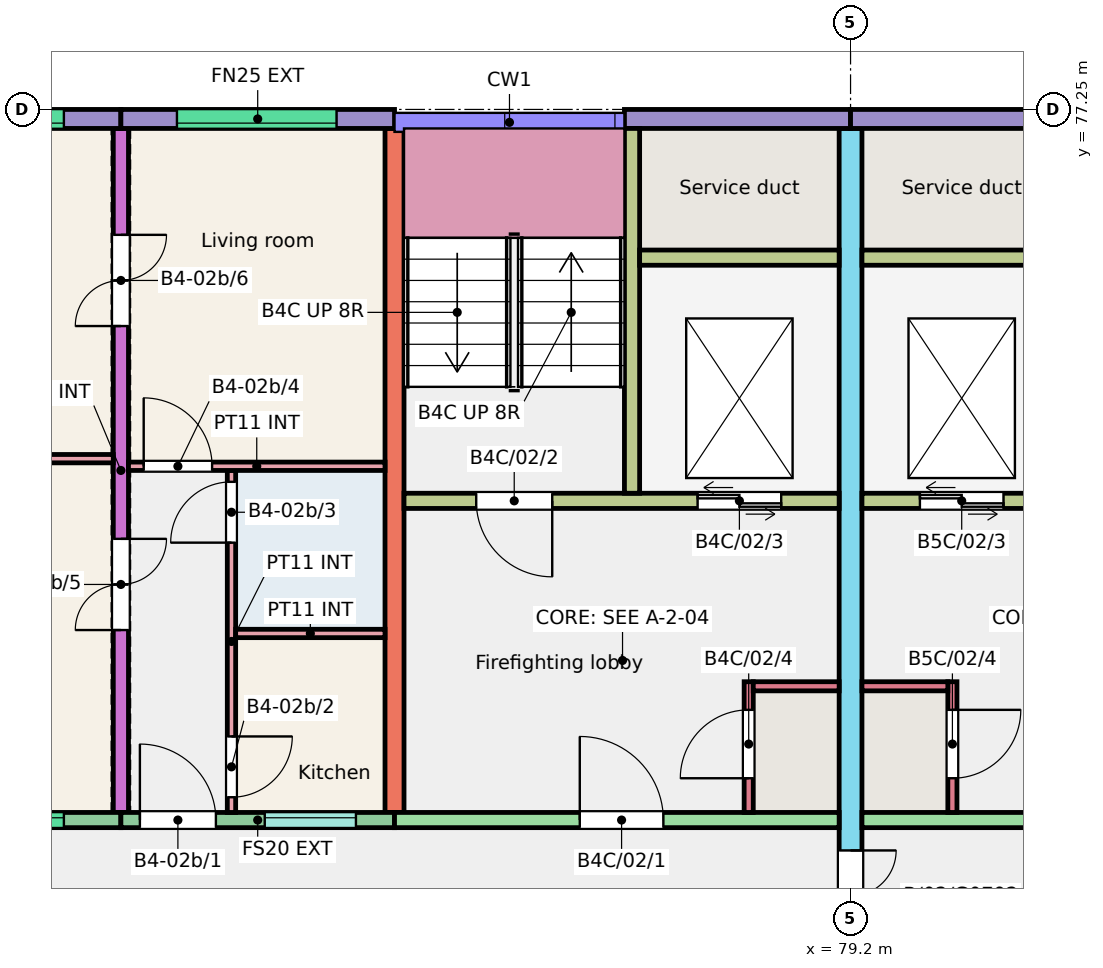
"""IFC4 building model, lengths in metres.
Left out: names, types, materials, properties, quantities, classifications, styles, units other than length and angle.
Written with IfcOpenShell. Run it as: python <this file> out.ifc"""

import sys

from ifc_helpers import new_model, si_unit, direction, frame, frame_2d, origin, place, context, subcontext, project, spatial, rectangle, extrude, element, fill, save


model = new_model("IFC4")
c1 = context("Model", 3, precision=1e-05, world=origin(), true_north=direction((0.0, 1.0)))
c2 = subcontext(c1, "Body", "Model", "MODEL_VIEW")
j1 = project(units=[si_unit("LENGTHUNIT", "METRE"), si_unit("PLANEANGLEUNIT", "RADIAN")], contexts=[c1])
p1 = place(None, origin())
s1 = spatial("IfcSite", under=j1, at=p1, CompositionType="ELEMENT")
p2 = place(p1, origin())
s2 = spatial("IfcBuilding", under=s1, at=p2, CompositionType="ELEMENT")
p3 = place(p2, frame((0.0, 0.0, 6.0)))
s3 = spatial("IfcBuildingStorey", under=s2, at=p3, CompositionType="ELEMENT", Elevation=6.0)
p4 = place(p3, frame((69.6, 68.0, 0.0), z_axis=(0.0, 0.0, 1.0), x_axis=(0.0, 1.0, 0.0)))
e1 = element("IfcWall", 1, at=p4, inside=s3, PredefinedType="SHEAR", context=c2, shape_type="SweptSolid", body=[
    extrude(rectangle(XDim=9.0, YDim=0.2, at=frame_2d((4.5, 0.0))), origin(), (0.0, 0.0, 1.0), 3.0),
])
p5 = place(p4, frame((2.4, 0.0, 0.0)))
e2 = element("IfcOpeningElement", 2, at=p5, cuts=e1, PredefinedType="OPENING", context=c2, shape_type="SweptSolid", body=[
    extrude(rectangle(XDim=1.2, YDim=2.1, at=frame_2d((0.6, 1.05))), frame((0.0, 0.11, 0.0), z_axis=(0.0, -1.0, 0.0), x_axis=(1.0, 0.0, 0.0)), (0.0, 0.0, 1.0), 0.22),
])
p6 = place(p4, frame((6.4, 0.0, 0.0)))
e3 = element("IfcOpeningElement", 3, at=p6, cuts=e1, PredefinedType="OPENING", context=c2, shape_type="SweptSolid", body=[
    extrude(rectangle(XDim=1.2, YDim=2.1, at=frame_2d((0.6, 1.05))), frame((0.0, 0.11, 0.0), z_axis=(0.0, -1.0, 0.0), x_axis=(1.0, 0.0, 0.0)), (0.0, 0.0, 1.0), 0.22),
])
p7 = place(p3, frame((73.2, 68.0, 0.0), z_axis=(0.0, 0.0, 1.0), x_axis=(0.0, 1.0, 0.0)))
e4 = element("IfcWall", 4, at=p7, inside=s3, PredefinedType="SHEAR", context=c2, shape_type="SweptSolid", body=[
    extrude(rectangle(XDim=9.0, YDim=0.25, at=frame_2d((4.5, 0.0))), origin(), (0.0, 0.0, 1.0), 3.0),
])
p8 = place(p3, frame((79.2, 66.0, 0.0), z_axis=(0.0, 0.0, 1.0), x_axis=(0.0, 1.0, 0.0)))
e5 = element("IfcWall", 5, at=p8, inside=s3, PredefinedType="SHEAR", context=c2, shape_type="SweptSolid", body=[
    extrude(rectangle(XDim=11.0, YDim=0.3, at=frame_2d((5.5, 0.0))), origin(), (0.0, 0.0, 1.0), 3.0),
])
p9 = place(p8, frame((0.3, 0.0, 0.0)))
e6 = element("IfcOpeningElement", 6, at=p9, cuts=e5, PredefinedType="OPENING", context=c2, shape_type="SweptSolid", body=[
    extrude(rectangle(XDim=1.2, YDim=2.1, at=frame_2d((0.6, 1.05))), frame((0.0, 0.16, 0.0), z_axis=(0.0, -1.0, 0.0), x_axis=(1.0, 0.0, 0.0)), (0.0, 0.0, 1.0), 0.32),
])
p10 = place(p3, frame((66.0, 77.125, 0.0), z_axis=(0.0, 0.0, 1.0), x_axis=(1.0, 0.0, 0.0)))
e7 = element("IfcWall", 7, at=p10, inside=s3, PredefinedType="SOLIDWALL", context=c2, shape_type="SweptSolid", body=[
    extrude(rectangle(XDim=3.6, YDim=0.25, at=frame_2d((1.8, 0.0))), origin(), (0.0, 0.0, 1.0), 3.0),
])
p11 = place(p10, frame((0.75, 0.0, 1.2)))
e8 = element("IfcOpeningElement", 8, at=p11, cuts=e7, PredefinedType="OPENING", context=c2, shape_type="SweptSolid", body=[
    extrude(rectangle(XDim=2.1, YDim=1.2, at=frame_2d((1.05, 0.6))), frame((0.0, 0.135, 0.0), z_axis=(0.0, -1.0, 0.0), x_axis=(1.0, 0.0, 0.0)), (0.0, 0.0, 1.0), 0.27),
])
p12 = place(p3, frame((66.0, 67.9, 0.0), z_axis=(0.0, 0.0, 1.0), x_axis=(1.0, 0.0, 0.0)))
e9 = element("IfcWall", 9, at=p12, inside=s3, PredefinedType="SOLIDWALL", context=c2, shape_type="SweptSolid", body=[
    extrude(rectangle(XDim=3.6, YDim=0.2, at=frame_2d((1.8, 0.0))), origin(), (0.0, 0.0, 1.0), 3.0),
])
p13 = place(p12, frame((0.75, 0.0, 1.2)))
e10 = element("IfcOpeningElement", 10, at=p13, cuts=e9, PredefinedType="OPENING", context=c2, shape_type="SweptSolid", body=[
    extrude(rectangle(XDim=2.1, YDim=1.2, at=frame_2d((1.05, 0.6))), frame((0.0, 0.11, 0.0), z_axis=(0.0, -1.0, 0.0), x_axis=(1.0, 0.0, 0.0)), (0.0, 0.0, 1.0), 0.22),
])
p14 = place(p3, frame((69.6, 77.125, 0.0), z_axis=(0.0, 0.0, 1.0), x_axis=(1.0, 0.0, 0.0)))
e11 = element("IfcWall", 11, at=p14, inside=s3, PredefinedType="SOLIDWALL", context=c2, shape_type="SweptSolid", body=[
    extrude(rectangle(XDim=3.6, YDim=0.25, at=frame_2d((1.8, 0.0))), origin(), (0.0, 0.0, 1.0), 3.0),
])
p15 = place(p14, frame((0.738, 0.0, 1.2)))
e12 = element("IfcOpeningElement", 12, at=p15, cuts=e11, PredefinedType="OPENING", context=c2, shape_type="SweptSolid", body=[
    extrude(rectangle(XDim=2.1, YDim=1.2, at=frame_2d((1.05, 0.6))), frame((0.0, 0.135, 0.0), z_axis=(0.0, -1.0, 0.0), x_axis=(1.0, 0.0, 0.0)), (0.0, 0.0, 1.0), 0.27),
])
p16 = place(p3, frame((69.6, 67.9, 0.0), z_axis=(0.0, 0.0, 1.0), x_axis=(1.0, 0.0, 0.0)))
e13 = element("IfcWall", 13, at=p16, inside=s3, PredefinedType="SOLIDWALL", context=c2, shape_type="SweptSolid", body=[
    extrude(rectangle(XDim=3.6, YDim=0.2, at=frame_2d((1.8, 0.0))), origin(), (0.0, 0.0, 1.0), 3.0),
])
p17 = place(p16, frame((1.893, 0.0, 1.1)))
e14 = element("IfcOpeningElement", 14, at=p17, cuts=e13, PredefinedType="OPENING", context=c2, shape_type="SweptSolid", body=[
    extrude(rectangle(XDim=1.2, YDim=1.3, at=frame_2d((0.6, 0.65))), frame((0.0, 0.11, 0.0), z_axis=(0.0, -1.0, 0.0), x_axis=(1.0, 0.0, 0.0)), (0.0, 0.0, 1.0), 0.22),
])
p18 = place(p16, frame((0.25, 0.0, 0.0)))
e15 = element("IfcOpeningElement", 15, at=p18, cuts=e13, PredefinedType="OPENING", context=c2, shape_type="SweptSolid", body=[
    extrude(rectangle(XDim=1.0, YDim=2.1, at=frame_2d((0.5, 1.05))), frame((0.0, 0.11, 0.0), z_axis=(0.0, -1.0, 0.0), x_axis=(1.0, 0.0, 0.0)), (0.0, 0.0, 1.0), 0.22),
])
p19 = place(p3, frame((76.225, 77.125, 0.0), z_axis=(0.0, 0.0, 1.0), x_axis=(1.0, 0.0, 0.0)))
e16 = element("IfcWall", 16, at=p19, inside=s3, PredefinedType="SOLIDWALL", context=c2, shape_type="SweptSolid", body=[
    extrude(rectangle(XDim=2.975, YDim=0.25, at=frame_2d((1.487, 0.0))), origin(), (0.0, 0.0, 1.0), 3.0),
])
p20 = place(p3, frame((73.2, 67.9, 0.0), z_axis=(0.0, 0.0, 1.0), x_axis=(1.0, 0.0, 0.0)))
e17 = element("IfcWall", 17, at=p20, inside=s3, PredefinedType="SHEAR", context=c2, shape_type="SweptSolid", body=[
    extrude(rectangle(XDim=5.85, YDim=0.2, at=frame_2d((2.925, 0.0))), origin(), (0.0, 0.0, 1.0), 3.0),
])
p21 = place(p20, frame((2.438, 0.0, 0.0)))
e18 = element("IfcOpeningElement", 18, at=p21, cuts=e17, PredefinedType="OPENING", context=c2, shape_type="SweptSolid", body=[
    extrude(rectangle(XDim=1.1, YDim=2.1, at=frame_2d((0.55, 1.05))), frame((0.0, 0.11, 0.0), z_axis=(0.0, -1.0, 0.0), x_axis=(1.0, 0.0, 0.0)), (0.0, 0.0, 1.0), 0.22),
])
p22 = place(p3, frame((73.325, 72.1, 0.0), z_axis=(0.0, 0.0, 1.0), x_axis=(1.0, 0.0, 0.0)))
e19 = element("IfcWall", 19, at=p22, inside=s3, PredefinedType="SHEAR", context=c2, shape_type="SweptSolid", body=[
    extrude(rectangle(XDim=5.725, YDim=0.2, at=frame_2d((2.863, 0.0))), origin(), (0.0, 0.0, 1.0), 3.0),
])
p23 = place(p22, frame((0.95, 0.0, 0.0)))
e20 = element("IfcOpeningElement", 20, at=p23, cuts=e19, PredefinedType="OPENING", context=c2, shape_type="SweptSolid", body=[
    extrude(rectangle(XDim=1.0, YDim=2.1, at=frame_2d((0.5, 1.05))), frame((0.0, 0.11, 0.0), z_axis=(0.0, -1.0, 0.0), x_axis=(1.0, 0.0, 0.0)), (0.0, 0.0, 1.0), 0.22),
])
p24 = place(p22, frame((3.863, 0.0, 0.0)))
e21 = element("IfcOpeningElement", 21, at=p24, cuts=e19, PredefinedType="OPENING", context=c2, shape_type="SweptSolid", body=[
    extrude(rectangle(XDim=1.1, YDim=2.1, at=frame_2d((0.55, 1.05))), frame((0.0, 0.11, 0.0), z_axis=(0.0, -1.0, 0.0), x_axis=(1.0, 0.0, 0.0)), (0.0, 0.0, 1.0), 0.22),
])
p25 = place(p3, frame((76.325, 72.2, 0.0), z_axis=(0.0, 0.0, 1.0), x_axis=(0.0, 1.0, 0.0)))
e22 = element("IfcWall", 22, at=p25, inside=s3, PredefinedType="SHEAR", context=c2, shape_type="SweptSolid", body=[
    extrude(rectangle(XDim=4.8, YDim=0.2, at=frame_2d((2.4, 0.0))), origin(), (0.0, 0.0, 1.0), 3.0),
])
p26 = place(p3, frame((76.425, 75.3, 0.0), z_axis=(0.0, 0.0, 1.0), x_axis=(1.0, 0.0, 0.0)))
e23 = element("IfcWall", 23, at=p26, inside=s3, PredefinedType="SHEAR", context=c2, shape_type="SweptSolid", body=[
    extrude(rectangle(XDim=2.625, YDim=0.2, at=frame_2d((1.312, 0.0))), origin(), (0.0, 0.0, 1.0), 3.0),
])
p27 = place(p3, frame((77.86, 68.0, 0.0), z_axis=(0.0, 0.0, 1.0), x_axis=(0.0, 1.0, 0.0)))
e24 = element("IfcWall", 24, at=p27, inside=s3, PredefinedType="SHEAR", context=c2, shape_type="SweptSolid", body=[
    extrude(rectangle(XDim=1.72, YDim=0.12, at=frame_2d((0.86, 0.0))), origin(), (0.0, 0.0, 1.0), 3.0),
])
p28 = place(p27, frame((0.45, 0.0, 0.0)))
e25 = element("IfcOpeningElement", 25, at=p28, cuts=e24, PredefinedType="OPENING", context=c2, shape_type="SweptSolid", body=[
    extrude(rectangle(XDim=0.9, YDim=2.1, at=frame_2d((0.45, 1.05))), frame((0.0, 0.07, 0.0), z_axis=(0.0, -1.0, 0.0), x_axis=(1.0, 0.0, 0.0)), (0.0, 0.0, 1.0), 0.14),
])
p29 = place(p3, frame((77.92, 69.66, 0.0), z_axis=(0.0, 0.0, 1.0), x_axis=(1.0, 0.0, 0.0)))
e26 = element("IfcWall", 26, at=p29, inside=s3, PredefinedType="SHEAR", context=c2, shape_type="SweptSolid", body=[
    extrude(rectangle(XDim=1.13, YDim=0.12, at=frame_2d((0.565, 0.0))), origin(), (0.0, 0.0, 1.0), 3.0),
])
p30 = place(p3, frame((79.2, 77.125, 0.0), z_axis=(0.0, 0.0, 1.0), x_axis=(1.0, 0.0, 0.0)))
e27 = element("IfcWall", 27, at=p30, inside=s3, PredefinedType="SOLIDWALL", context=c2, shape_type="SweptSolid", body=[
    extrude(rectangle(XDim=2.975, YDim=0.25, at=frame_2d((1.488, 0.0))), origin(), (0.0, 0.0, 1.0), 3.0),
])
p31 = place(p3, frame((79.35, 67.9, 0.0), z_axis=(0.0, 0.0, 1.0), x_axis=(1.0, 0.0, 0.0)))
e28 = element("IfcWall", 28, at=p31, inside=s3, PredefinedType="SHEAR", context=c2, shape_type="SweptSolid", body=[
    extrude(rectangle(XDim=5.85, YDim=0.2, at=frame_2d((2.925, 0.0))), origin(), (0.0, 0.0, 1.0), 3.0),
])
p32 = place(p31, frame((2.312, 0.0, 0.0)))
e29 = element("IfcOpeningElement", 29, at=p32, cuts=e28, PredefinedType="OPENING", context=c2, shape_type="SweptSolid", body=[
    extrude(rectangle(XDim=1.1, YDim=2.1, at=frame_2d((0.55, 1.05))), frame((0.0, 0.11, 0.0), z_axis=(0.0, -1.0, 0.0), x_axis=(1.0, 0.0, 0.0)), (0.0, 0.0, 1.0), 0.22),
])
p33 = place(p3, frame((79.35, 72.1, 0.0), z_axis=(0.0, 0.0, 1.0), x_axis=(1.0, 0.0, 0.0)))
e30 = element("IfcWall", 30, at=p33, inside=s3, PredefinedType="SHEAR", context=c2, shape_type="SweptSolid", body=[
    extrude(rectangle(XDim=5.725, YDim=0.2, at=frame_2d((2.862, 0.0))), origin(), (0.0, 0.0, 1.0), 3.0),
])
p34 = place(p33, frame((3.775, 0.0, 0.0)))
e31 = element("IfcOpeningElement", 31, at=p34, cuts=e30, PredefinedType="OPENING", context=c2, shape_type="SweptSolid", body=[
    extrude(rectangle(XDim=1.0, YDim=2.1, at=frame_2d((0.5, 1.05))), frame((0.0, 0.11, 0.0), z_axis=(0.0, -1.0, 0.0), x_axis=(1.0, 0.0, 0.0)), (0.0, 0.0, 1.0), 0.22),
])
p35 = place(p33, frame((0.762, 0.0, 0.0)))
e32 = element("IfcOpeningElement", 32, at=p35, cuts=e30, PredefinedType="OPENING", context=c2, shape_type="SweptSolid", body=[
    extrude(rectangle(XDim=1.1, YDim=2.1, at=frame_2d((0.55, 1.05))), frame((0.0, 0.11, 0.0), z_axis=(0.0, -1.0, 0.0), x_axis=(1.0, 0.0, 0.0)), (0.0, 0.0, 1.0), 0.22),
])
p36 = place(p3, frame((79.35, 75.3, 0.0), z_axis=(0.0, 0.0, 1.0), x_axis=(1.0, 0.0, 0.0)))
e33 = element("IfcWall", 33, at=p36, inside=s3, PredefinedType="SHEAR", context=c2, shape_type="SweptSolid", body=[
    extrude(rectangle(XDim=2.625, YDim=0.2, at=frame_2d((1.312, 0.0))), origin(), (0.0, 0.0, 1.0), 3.0),
])
p37 = place(p3, frame((80.54, 68.0, 0.0), z_axis=(0.0, 0.0, 1.0), x_axis=(0.0, 1.0, 0.0)))
e34 = element("IfcWall", 34, at=p37, inside=s3, PredefinedType="SHEAR", context=c2, shape_type="SweptSolid", body=[
    extrude(rectangle(XDim=1.72, YDim=0.12, at=frame_2d((0.86, 0.0))), origin(), (0.0, 0.0, 1.0), 3.0),
])
p38 = place(p37, frame((0.45, 0.0, 0.0)))
e35 = element("IfcOpeningElement", 35, at=p38, cuts=e34, PredefinedType="OPENING", context=c2, shape_type="SweptSolid", body=[
    extrude(rectangle(XDim=0.9, YDim=2.1, at=frame_2d((0.45, 1.05))), frame((0.0, 0.07, 0.0), z_axis=(0.0, -1.0, 0.0), x_axis=(1.0, 0.0, 0.0)), (0.0, 0.0, 1.0), 0.14),
])
p39 = place(p3, frame((79.35, 69.66, 0.0), z_axis=(0.0, 0.0, 1.0), x_axis=(1.0, 0.0, 0.0)))
e36 = element("IfcWall", 36, at=p39, inside=s3, PredefinedType="SHEAR", context=c2, shape_type="SweptSolid", body=[
    extrude(rectangle(XDim=1.13, YDim=0.12, at=frame_2d((0.565, 0.0))), origin(), (0.0, 0.0, 1.0), 3.0),
])
p40 = place(p3, frame((71.055, 68.0, 0.0), z_axis=(0.0, 0.0, 1.0), x_axis=(0.0, 1.0, 0.0)))
e37 = element("IfcWall", 37, at=p40, inside=s3, PredefinedType="PARTITIONING", context=c2, shape_type="SweptSolid", body=[
    extrude(rectangle(XDim=4.5, YDim=0.11, at=frame_2d((2.25, 0.0))), origin(), (0.0, 0.0, 1.0), 2.8),
])
p41 = place(p40, frame((0.2, 0.0, 0.0)))
e38 = element("IfcOpeningElement", 38, at=p41, cuts=e37, PredefinedType="OPENING", context=c2, shape_type="SweptSolid", body=[
    extrude(rectangle(XDim=0.8, YDim=2.1, at=frame_2d((0.4, 1.05))), frame((0.0, 0.065, 0.0), z_axis=(0.0, -1.0, 0.0), x_axis=(1.0, 0.0, 0.0)), (0.0, 0.0, 1.0), 0.13),
])
p42 = place(p40, frame((3.55, 0.0, 0.0)))
e39 = element("IfcOpeningElement", 39, at=p42, cuts=e37, PredefinedType="OPENING", context=c2, shape_type="SweptSolid", body=[
    extrude(rectangle(XDim=0.8, YDim=2.1, at=frame_2d((0.4, 1.05))), frame((0.0, 0.065, 0.0), z_axis=(0.0, -1.0, 0.0), x_axis=(1.0, 0.0, 0.0)), (0.0, 0.0, 1.0), 0.13),
])
p43 = place(p3, frame((71.11, 70.355, 0.0), z_axis=(0.0, 0.0, 1.0), x_axis=(1.0, 0.0, 0.0)))
e40 = element("IfcWall", 40, at=p43, inside=s3, PredefinedType="PARTITIONING", context=c2, shape_type="SweptSolid", body=[
    extrude(rectangle(XDim=1.965, YDim=0.11, at=frame_2d((0.982, 0.0))), origin(), (0.0, 0.0, 1.0), 2.8),
])
p44 = place(p3, frame((69.7, 72.555, 0.0), z_axis=(0.0, 0.0, 1.0), x_axis=(1.0, 0.0, 0.0)))
e41 = element("IfcWall", 41, at=p44, inside=s3, PredefinedType="PARTITIONING", context=c2, shape_type="SweptSolid", body=[
    extrude(rectangle(XDim=3.375, YDim=0.11, at=frame_2d((1.688, 0.0))), origin(), (0.0, 0.0, 1.0), 2.8),
])
p45 = place(p44, frame((0.2, 0.0, 0.0)))
e42 = element("IfcOpeningElement", 42, at=p45, cuts=e41, PredefinedType="OPENING", context=c2, shape_type="SweptSolid", body=[
    extrude(rectangle(XDim=0.9, YDim=2.1, at=frame_2d((0.45, 1.05))), frame((0.0, 0.065, 0.0), z_axis=(0.0, -1.0, 0.0), x_axis=(1.0, 0.0, 0.0)), (0.0, 0.0, 1.0), 0.13),
])
p46 = place(p3, frame((66.1, 72.655, 0.0), z_axis=(0.0, 0.0, 1.0), x_axis=(1.0, 0.0, 0.0)))
e43 = element("IfcWall", 43, at=p46, inside=s3, PredefinedType="PARTITIONING", context=c2, shape_type="SweptSolid", body=[
    extrude(rectangle(XDim=3.4, YDim=0.11, at=frame_2d((1.7, 0.0))), origin(), (0.0, 0.0, 1.0), 2.8),
])
p47 = place(p13, origin())
e44 = element("IfcWindow", 44, at=p47, inside=s3, PartitioningType="SINGLE_PANEL", PredefinedType="WINDOW", context=c2, shape_type="SweptSolid", body=[
    extrude(rectangle(XDim=2.1, YDim=1.2, at=frame_2d((1.05, 0.6))), frame((0.0, 0.06, 0.0), z_axis=(0.0, -1.0, 0.0), x_axis=(1.0, 0.0, 0.0)), (0.0, 0.0, 1.0), 0.06),
])
fill(e10, e44)
p48 = place(p11, origin())
e45 = element("IfcWindow", 45, at=p48, inside=s3, PartitioningType="SINGLE_PANEL", PredefinedType="WINDOW", context=c2, shape_type="SweptSolid", body=[
    extrude(rectangle(XDim=2.1, YDim=1.2, at=frame_2d((1.05, 0.6))), frame((0.0, -0.025, 0.0), z_axis=(0.0, -1.0, 0.0), x_axis=(1.0, 0.0, 0.0)), (0.0, 0.0, 1.0), 0.06),
])
fill(e8, e45)
p49 = place(p17, origin())
e46 = element("IfcWindow", 46, at=p49, inside=s3, PartitioningType="SINGLE_PANEL", PredefinedType="WINDOW", context=c2, shape_type="SweptSolid", body=[
    extrude(rectangle(XDim=1.2, YDim=1.3, at=frame_2d((0.6, 0.65))), frame((0.0, 0.06, 0.0), z_axis=(0.0, -1.0, 0.0), x_axis=(1.0, 0.0, 0.0)), (0.0, 0.0, 1.0), 0.06),
])
fill(e14, e46)
p50 = place(p15, origin())
e47 = element("IfcWindow", 47, at=p50, inside=s3, PartitioningType="SINGLE_PANEL", PredefinedType="WINDOW", context=c2, shape_type="SweptSolid", body=[
    extrude(rectangle(XDim=2.1, YDim=1.2, at=frame_2d((1.05, 0.6))), frame((0.0, -0.025, 0.0), z_axis=(0.0, -1.0, 0.0), x_axis=(1.0, 0.0, 0.0)), (0.0, 0.0, 1.0), 0.06),
])
fill(e12, e47)
p51 = place(p18, origin())
e48 = element("IfcDoor", 48, at=p51, inside=s3, OperationType="SINGLE_SWING_LEFT", PredefinedType="DOOR", context=c2, shape_type="SweptSolid", body=[
    extrude(rectangle(XDim=1.0, YDim=2.1, at=frame_2d((0.5, 1.05))), frame((0.0, 0.025, 0.0), z_axis=(0.0, -1.0, 0.0), x_axis=(1.0, 0.0, 0.0)), (0.0, 0.0, 1.0), 0.05),
])
fill(e15, e48)
p52 = place(p41, origin())
e49 = element("IfcDoor", 49, at=p52, inside=s3, OperationType="SINGLE_SWING_RIGHT", PredefinedType="DOOR", context=c2, shape_type="SweptSolid", body=[
    extrude(rectangle(XDim=0.8, YDim=2.1, at=frame_2d((0.4, 1.05))), frame((0.0, 0.025, 0.0), z_axis=(0.0, -1.0, 0.0), x_axis=(1.0, 0.0, 0.0)), (0.0, 0.0, 1.0), 0.05),
])
fill(e38, e49)
p53 = place(p42, origin())
e50 = element("IfcDoor", 50, at=p53, inside=s3, OperationType="SINGLE_SWING_LEFT", PredefinedType="DOOR", context=c2, shape_type="SweptSolid", body=[
    extrude(rectangle(XDim=0.8, YDim=2.1, at=frame_2d((0.4, 1.05))), frame((0.0, 0.025, 0.0), z_axis=(0.0, -1.0, 0.0), x_axis=(1.0, 0.0, 0.0)), (0.0, 0.0, 1.0), 0.05),
])
fill(e39, e50)
p54 = place(p45, origin())
e51 = element("IfcDoor", 51, at=p54, inside=s3, OperationType="SINGLE_SWING_LEFT", PredefinedType="DOOR", context=c2, shape_type="SweptSolid", body=[
    extrude(rectangle(XDim=0.9, YDim=2.1, at=frame_2d((0.45, 1.05))), frame((0.0, 0.025, 0.0), z_axis=(0.0, -1.0, 0.0), x_axis=(1.0, 0.0, 0.0)), (0.0, 0.0, 1.0), 0.05),
])
fill(e42, e51)
p55 = place(p5, origin())
e52 = element("IfcDoor", 52, at=p55, inside=s3, OperationType="DOUBLE_DOOR_SINGLE_SWING", PredefinedType="DOOR", context=c2, shape_type="SweptSolid", body=[
    extrude(rectangle(XDim=1.2, YDim=2.1, at=frame_2d((0.6, 1.05))), frame((0.0, 0.025, 0.0), z_axis=(0.0, -1.0, 0.0), x_axis=(1.0, 0.0, 0.0)), (0.0, 0.0, 1.0), 0.05),
])
fill(e2, e52)
p56 = place(p6, origin())
e53 = element("IfcDoor", 53, at=p56, inside=s3, OperationType="DOUBLE_DOOR_SINGLE_SWING", PredefinedType="DOOR", context=c2, shape_type="SweptSolid", body=[
    extrude(rectangle(XDim=1.2, YDim=2.1, at=frame_2d((0.6, 1.05))), frame((0.0, 0.025, 0.0), z_axis=(0.0, -1.0, 0.0), x_axis=(1.0, 0.0, 0.0)), (0.0, 0.0, 1.0), 0.05),
])
fill(e3, e53)
p57 = place(p21, origin())
e54 = element("IfcDoor", 54, at=p57, inside=s3, OperationType="SINGLE_SWING_LEFT", PredefinedType="DOOR", context=c2, shape_type="SweptSolid", body=[
    extrude(rectangle(XDim=1.1, YDim=2.1, at=frame_2d((0.55, 1.05))), frame((0.0, 0.025, 0.0), z_axis=(0.0, -1.0, 0.0), x_axis=(1.0, 0.0, 0.0)), (0.0, 0.0, 1.0), 0.05),
])
fill(e18, e54)
p58 = place(p23, origin())
e55 = element("IfcDoor", 55, at=p58, inside=s3, OperationType="SINGLE_SWING_RIGHT", PredefinedType="DOOR", context=c2, shape_type="SweptSolid", body=[
    extrude(rectangle(XDim=1.0, YDim=2.1, at=frame_2d((0.5, 1.05))), frame((0.0, 0.025, 0.0), z_axis=(0.0, -1.0, 0.0), x_axis=(1.0, 0.0, 0.0)), (0.0, 0.0, 1.0), 0.05),
])
fill(e20, e55)
p59 = place(p24, origin())
e56 = element("IfcDoor", 56, at=p59, inside=s3, OperationType="DOUBLE_DOOR_SLIDING", PredefinedType="DOOR", context=c2, shape_type="SweptSolid", body=[
    extrude(rectangle(XDim=1.1, YDim=2.1, at=frame_2d((0.55, 1.05))), frame((0.0, 0.025, 0.0), z_axis=(0.0, -1.0, 0.0), x_axis=(1.0, 0.0, 0.0)), (0.0, 0.0, 1.0), 0.05),
])
fill(e21, e56)
p60 = place(p28, origin())
e57 = element("IfcDoor", 57, at=p60, inside=s3, OperationType="SINGLE_SWING_LEFT", PredefinedType="DOOR", context=c2, shape_type="SweptSolid", body=[
    extrude(rectangle(XDim=0.9, YDim=2.1, at=frame_2d((0.45, 1.05))), frame((0.0, 0.025, 0.0), z_axis=(0.0, -1.0, 0.0), x_axis=(1.0, 0.0, 0.0)), (0.0, 0.0, 1.0), 0.05),
])
fill(e25, e57)
p61 = place(p35, origin())
e58 = element("IfcDoor", 58, at=p61, inside=s3, OperationType="DOUBLE_DOOR_SLIDING", PredefinedType="DOOR", context=c2, shape_type="SweptSolid", body=[
    extrude(rectangle(XDim=1.1, YDim=2.1, at=frame_2d((0.55, 1.05))), frame((0.0, 0.025, 0.0), z_axis=(0.0, -1.0, 0.0), x_axis=(1.0, 0.0, 0.0)), (0.0, 0.0, 1.0), 0.05),
])
fill(e32, e58)
p62 = place(p38, origin())
e59 = element("IfcDoor", 59, at=p62, inside=s3, OperationType="SINGLE_SWING_RIGHT", PredefinedType="DOOR", context=c2, shape_type="SweptSolid", body=[
    extrude(rectangle(XDim=0.9, YDim=2.1, at=frame_2d((0.45, 1.05))), frame((0.0, 0.025, 0.0), z_axis=(0.0, -1.0, 0.0), x_axis=(1.0, 0.0, 0.0)), (0.0, 0.0, 1.0), 0.05),
])
fill(e35, e59)
p63 = place(p9, origin())
e60 = element("IfcDoor", 60, at=p63, inside=s3, OperationType="DOUBLE_DOOR_SINGLE_SWING", PredefinedType="DOOR", context=c2, shape_type="SweptSolid", body=[
    extrude(rectangle(XDim=1.2, YDim=2.1, at=frame_2d((0.6, 1.05))), frame((0.0, 0.025, 0.0), z_axis=(0.0, -1.0, 0.0), x_axis=(1.0, 0.0, 0.0)), (0.0, 0.0, 1.0), 0.05),
])
fill(e6, e60)
save(model, sys.argv[1])
